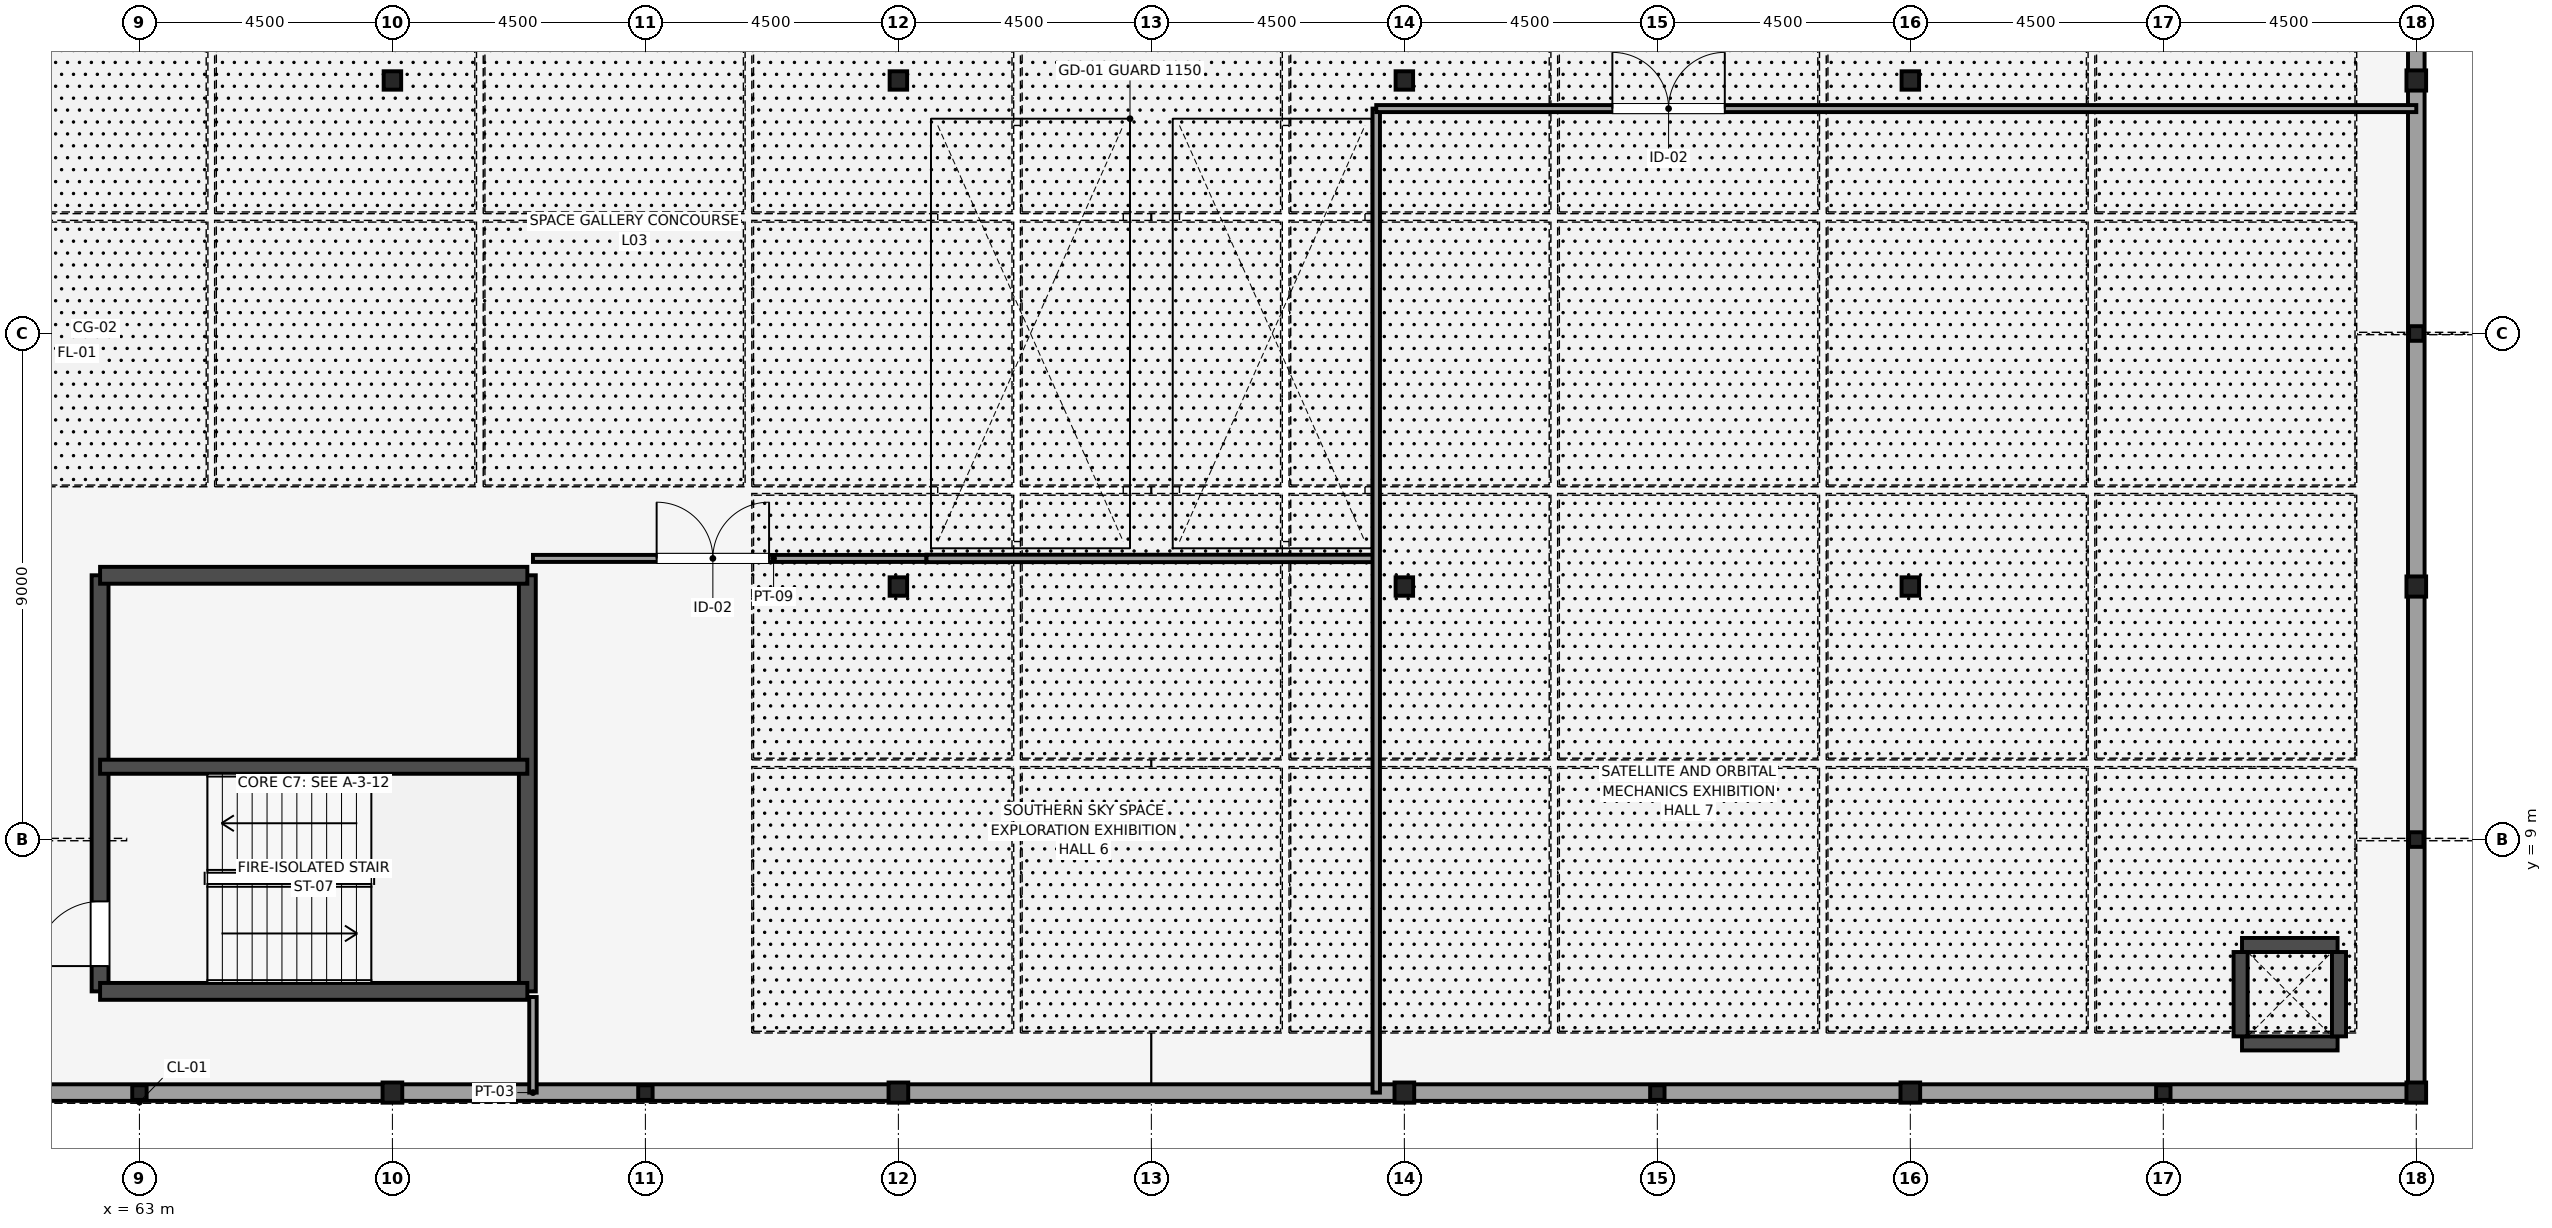
"""IFC4 building model, lengths in metres.
Left out: names, types, materials, properties, quantities, classifications, styles, units other than length and angle.
Written with IfcOpenShell. Run it as: python <this file> out.ifc"""

import sys

from ifc_helpers import new_model, si_unit, direction, frame, frame_2d, origin, origin_2d, place, context, subcontext, project, spatial, rectangle, i_section, extrude, element, fill, save


model = new_model("IFC4")
c1 = context("Model", 3, precision=1e-05, world=origin(), true_north=direction((0.0, 1.0)))
c2 = subcontext(c1, "Body", "Model", "MODEL_VIEW")
j1 = project(units=[si_unit("LENGTHUNIT", "METRE"), si_unit("PLANEANGLEUNIT", "RADIAN")], contexts=[c1])
p1 = place(None, origin())
s1 = spatial("IfcSite", under=j1, at=p1, CompositionType="ELEMENT")
p2 = place(p1, origin())
s2 = spatial("IfcBuilding", under=s1, at=p2, CompositionType="ELEMENT")
p3 = place(p2, frame((0.0, 0.0, 14.4)))
s3 = spatial("IfcBuildingStorey", under=s2, at=p3, CompositionType="ELEMENT", Elevation=14.4)
p4 = place(p3, frame((67.5, 4.5, 0.0), z_axis=(0.0, 0.0, 1.0), x_axis=(1.0, 0.0, 0.0)))
e1 = element("IfcColumn", 1, at=p4, inside=s3, PredefinedType="COLUMN", context=c2, shape_type="SweptSolid", body=[
    extrude(i_section(OverallWidth=0.35, OverallDepth=0.359, WebThickness=0.016, FlangeThickness=0.024, FilletRadius=0.014, at=origin_2d()), origin(), (0.0, 0.0, 1.0), 4.5),
])
p5 = place(p3, frame((67.5, 22.5, 0.0), z_axis=(0.0, 0.0, 1.0), x_axis=(1.0, 0.0, 0.0)))
e2 = element("IfcColumn", 2, at=p5, inside=s3, PredefinedType="COLUMN", context=c2, shape_type="SweptSolid", body=[
    extrude(i_section(OverallWidth=0.311, OverallDepth=0.327, WebThickness=0.016, FlangeThickness=0.025, FilletRadius=0.017, at=origin_2d()), origin(), (0.0, 0.0, 1.0), 4.5),
])
p6 = place(p3, frame((76.5, 4.5, 0.0), z_axis=(0.0, 0.0, 1.0), x_axis=(1.0, 0.0, 0.0)))
e3 = element("IfcColumn", 3, at=p6, inside=s3, PredefinedType="COLUMN", context=c2, shape_type="SweptSolid", body=[
    extrude(i_section(OverallWidth=0.35, OverallDepth=0.359, WebThickness=0.016, FlangeThickness=0.024, FilletRadius=0.014, at=origin_2d()), origin(), (0.0, 0.0, 1.0), 4.5),
])
for number, where, z_axis, x_axis in (
    (4, (76.5, 13.5, 0.0), (0.0, 0.0, 1.0), (1.0, 0.0, 0.0)),
    (5, (76.5, 22.5, 0.0), (0.0, 0.0, 1.0), (1.0, 0.0, 0.0)),
):
    element("IfcColumn", number, at=place(p3, frame(where, z_axis=z_axis, x_axis=x_axis)), inside=s3, PredefinedType="COLUMN", context=c2, shape_type="SweptSolid", body=[
        extrude(i_section(OverallWidth=0.311, OverallDepth=0.327, WebThickness=0.016, FlangeThickness=0.025, FilletRadius=0.017, at=origin_2d()), origin(), (0.0, 0.0, 1.0), 4.5),
    ])
p7 = place(p3, frame((85.5, 4.5, 0.0), z_axis=(0.0, 0.0, 1.0), x_axis=(1.0, 0.0, 0.0)))
e6 = element("IfcColumn", 6, at=p7, inside=s3, PredefinedType="COLUMN", context=c2, shape_type="SweptSolid", body=[
    extrude(i_section(OverallWidth=0.35, OverallDepth=0.359, WebThickness=0.016, FlangeThickness=0.024, FilletRadius=0.014, at=origin_2d()), origin(), (0.0, 0.0, 1.0), 4.5),
])
for number, where, z_axis, x_axis in (
    (7, (85.5, 13.5, 0.0), (0.0, 0.0, 1.0), (1.0, 0.0, 0.0)),
    (8, (85.5, 22.5, 0.0), (0.0, 0.0, 1.0), (1.0, 0.0, 0.0)),
):
    element("IfcColumn", number, at=place(p3, frame(where, z_axis=z_axis, x_axis=x_axis)), inside=s3, PredefinedType="COLUMN", context=c2, shape_type="SweptSolid", body=[
        extrude(i_section(OverallWidth=0.311, OverallDepth=0.327, WebThickness=0.016, FlangeThickness=0.025, FilletRadius=0.017, at=origin_2d()), origin(), (0.0, 0.0, 1.0), 4.5),
    ])
p8 = place(p3, frame((94.5, 4.5, 0.0), z_axis=(0.0, 0.0, 1.0), x_axis=(1.0, 0.0, 0.0)))
e9 = element("IfcColumn", 9, at=p8, inside=s3, PredefinedType="COLUMN", context=c2, shape_type="SweptSolid", body=[
    extrude(i_section(OverallWidth=0.35, OverallDepth=0.359, WebThickness=0.016, FlangeThickness=0.024, FilletRadius=0.014, at=origin_2d()), origin(), (0.0, 0.0, 1.0), 4.5),
])
for number, where, z_axis, x_axis in (
    (10, (94.5, 13.5, 0.0), (0.0, 0.0, 1.0), (1.0, 0.0, 0.0)),
    (11, (94.5, 22.5, 0.0), (0.0, 0.0, 1.0), (1.0, 0.0, 0.0)),
):
    element("IfcColumn", number, at=place(p3, frame(where, z_axis=z_axis, x_axis=x_axis)), inside=s3, PredefinedType="COLUMN", context=c2, shape_type="SweptSolid", body=[
        extrude(i_section(OverallWidth=0.311, OverallDepth=0.327, WebThickness=0.016, FlangeThickness=0.025, FilletRadius=0.017, at=origin_2d()), origin(), (0.0, 0.0, 1.0), 4.5),
    ])
for number, where, z_axis, x_axis in (
    (12, (103.5, 4.5, 0.0), (0.0, 0.0, 1.0), (1.0, 0.0, 0.0)),
    (13, (103.5, 13.5, 0.0), (0.0, 0.0, 1.0), (1.0, 0.0, 0.0)),
    (14, (103.5, 22.5, 0.0), (0.0, 0.0, 1.0), (1.0, 0.0, 0.0)),
):
    element("IfcColumn", number, at=place(p3, frame(where, z_axis=z_axis, x_axis=x_axis)), inside=s3, PredefinedType="COLUMN", context=c2, shape_type="SweptSolid", body=[
        extrude(i_section(OverallWidth=0.35, OverallDepth=0.359, WebThickness=0.016, FlangeThickness=0.024, FilletRadius=0.014, at=origin_2d()), origin(), (0.0, 0.0, 1.0), 4.5),
    ])
for number, where, z_axis, x_axis in (
    (15, (63.0, 4.5, 0.0), (0.0, 0.0, 1.0), (1.0, 0.0, 0.0)),
    (16, (72.0, 4.5, 0.0), (0.0, 0.0, 1.0), (1.0, 0.0, 0.0)),
    (17, (90.0, 4.5, 0.0), (0.0, 0.0, 1.0), (1.0, 0.0, 0.0)),
    (18, (99.0, 4.5, 0.0), (0.0, 0.0, 1.0), (1.0, 0.0, 0.0)),
    (19, (103.5, 9.0, 0.0), (0.0, 0.0, 1.0), (1.0, 0.0, 0.0)),
    (20, (103.5, 18.0, 0.0), (0.0, 0.0, 1.0), (1.0, 0.0, 0.0)),
):
    element("IfcColumn", number, at=place(p3, frame(where, z_axis=z_axis, x_axis=x_axis)), inside=s3, PredefinedType="PILASTER", context=c2, shape_type="SweptSolid", body=[
        extrude(i_section(OverallWidth=0.256, OverallDepth=0.26, WebThickness=0.01, FlangeThickness=0.017, FilletRadius=0.014, at=origin_2d()), origin(), (0.0, 0.0, 1.0), 4.5),
    ])
p9 = place(p3, frame((62.3, 6.3, 0.0), z_axis=(0.0, 0.0, 1.0), x_axis=(0.0, 1.0, 0.0)))
e21 = element("IfcWall", 21, at=p9, inside=s3, PredefinedType="SHEAR", context=c2, shape_type="SweptSolid", body=[
    extrude(rectangle(XDim=7.4, YDim=0.3, at=frame_2d((3.7, 0.0))), origin(), (0.0, 0.0, 1.0), 4.5),
])
p10 = place(p9, frame((0.45, 0.0, 0.0)))
e22 = element("IfcOpeningElement", 22, at=p10, cuts=e21, PredefinedType="OPENING", context=c2, shape_type="SweptSolid", body=[
    extrude(rectangle(XDim=1.15, YDim=2.15, at=frame_2d((0.575, 1.075))), frame((0.0, 0.16, 0.0), z_axis=(0.0, -1.0, 0.0), x_axis=(1.0, 0.0, 0.0)), (0.0, 0.0, 1.0), 0.32),
])
p11 = place(p3, frame((69.9, 6.3, 0.0), z_axis=(0.0, 0.0, 1.0), x_axis=(0.0, 1.0, 0.0)))
e23 = element("IfcWall", 23, at=p11, inside=s3, PredefinedType="SHEAR", context=c2, shape_type="SweptSolid", body=[
    extrude(rectangle(XDim=7.4, YDim=0.3, at=frame_2d((3.7, 0.0))), origin(), (0.0, 0.0, 1.0), 4.5),
])
for number, where, z_axis, x_axis in (
    (24, (62.3, 6.3, 0.0), (0.0, 0.0, 1.0), (1.0, 0.0, 0.0)),
    (25, (62.3, 13.7, 0.0), (0.0, 0.0, 1.0), (1.0, 0.0, 0.0)),
):
    element("IfcWall", number, at=place(p3, frame(where, z_axis=z_axis, x_axis=x_axis)), inside=s3, PredefinedType="SHEAR", context=c2, shape_type="SweptSolid", body=[
        extrude(rectangle(XDim=7.6, YDim=0.3, at=frame_2d((3.8, 0.0))), origin(), (0.0, 0.0, 1.0), 4.5),
    ])
p12 = place(p3, frame((62.3, 10.295, 0.0), z_axis=(0.0, 0.0, 1.0), x_axis=(1.0, 0.0, 0.0)))
e26 = element("IfcWall", 26, at=p12, inside=s3, PredefinedType="SHEAR", context=c2, shape_type="SweptSolid", body=[
    extrude(rectangle(XDim=7.6, YDim=0.25, at=frame_2d((3.8, 0.0))), origin(), (0.0, 0.0, 1.0), 4.5),
])
for number, where, z_axis, x_axis in (
    (27, (100.4, 5.375, 0.0), (0.0, 0.0, 1.0), (1.0, 0.0, 0.0)),
    (28, (100.4, 7.125, 0.0), (0.0, 0.0, 1.0), (1.0, 0.0, 0.0)),
):
    element("IfcWall", number, at=place(p3, frame(where, z_axis=z_axis, x_axis=x_axis)), inside=s3, PredefinedType="SHEAR", context=c2, shape_type="SweptSolid", body=[
        extrude(rectangle(XDim=1.7, YDim=0.25, at=frame_2d((0.85, 0.0))), origin(), (0.0, 0.0, 1.0), 3.77),
    ])
for number, where, z_axis, x_axis in (
    (29, (100.375, 5.5, 0.0), (0.0, 0.0, 1.0), (0.0, 1.0, 0.0)),
    (30, (102.125, 5.5, 0.0), (0.0, 0.0, 1.0), (0.0, 1.0, 0.0)),
):
    element("IfcWall", number, at=place(p3, frame(where, z_axis=z_axis, x_axis=x_axis)), inside=s3, PredefinedType="SHEAR", context=c2, shape_type="SweptSolid", body=[
        extrude(rectangle(XDim=1.5, YDim=0.25, at=frame_2d((0.75, 0.0))), origin(), (0.0, 0.0, 1.0), 3.77),
    ])
for number, where, z_axis, x_axis in (
    (31, (58.5, 4.5, 0.0), (0.0, 0.0, 1.0), (1.0, 0.0, 0.0)),
    (32, (67.5, 4.5, 0.0), (0.0, 0.0, 1.0), (1.0, 0.0, 0.0)),
    (33, (76.5, 4.5, 0.0), (0.0, 0.0, 1.0), (1.0, 0.0, 0.0)),
    (34, (85.5, 4.5, 0.0), (0.0, 0.0, 1.0), (1.0, 0.0, 0.0)),
    (35, (94.5, 4.5, 0.0), (0.0, 0.0, 1.0), (1.0, 0.0, 0.0)),
    (36, (103.5, 4.5, 0.0), (0.0, 0.0, 1.0), (0.0, 1.0, 0.0)),
    (37, (103.5, 13.5, 0.0), (0.0, 0.0, 1.0), (0.0, 1.0, 0.0)),
    (38, (103.5, 22.5, 0.0), (0.0, 0.0, 1.0), (0.0, 1.0, 0.0)),
):
    element("IfcWall", number, at=place(p3, frame(where, z_axis=z_axis, x_axis=x_axis)), inside=s3, PredefinedType="STANDARD", context=c2, shape_type="SweptSolid", body=[
        extrude(rectangle(XDim=9.0, YDim=0.295, at=frame_2d((4.5, 0.0))), origin(), (0.0, 0.0, 1.0), 3.846),
    ])
p13 = place(p3, frame((70.0, 4.5, 0.0), z_axis=(0.0, 0.0, 1.0), x_axis=(0.0, 1.0, 0.0)))
e39 = element("IfcWall", 39, at=p13, inside=s3, PredefinedType="PARTITIONING", context=c2, shape_type="SweptSolid", body=[
    extrude(rectangle(XDim=1.7, YDim=0.132, at=frame_2d((0.85, 0.0))), origin(), (0.0, 0.0, 1.0), 4.32),
])
p14 = place(p3, frame((70.0, 14.0, 0.0), z_axis=(0.0, 0.0, 1.0), x_axis=(1.0, 0.0, 0.0)))
e40 = element("IfcWall", 40, at=p14, inside=s3, PredefinedType="MOVABLE", context=c2, shape_type="SweptSolid", body=[
    extrude(rectangle(XDim=7.0, YDim=0.125, at=frame_2d((3.5, 0.0))), origin(), (0.0, 0.0, 1.0), 4.32),
])
p15 = place(p14, frame((2.2, 0.0, 0.0)))
e41 = element("IfcOpeningElement", 41, at=p15, cuts=e40, PredefinedType="OPENING", context=c2, shape_type="SweptSolid", body=[
    extrude(rectangle(XDim=2.0, YDim=2.4, at=frame_2d((1.0, 1.2))), frame((0.0, 0.073, 0.0), z_axis=(0.0, -1.0, 0.0), x_axis=(1.0, 0.0, 0.0)), (0.0, 0.0, 1.0), 0.145),
])
p16 = place(p3, frame((77.0, 14.0, 0.0), z_axis=(0.0, 0.0, 1.0), x_axis=(1.0, 0.0, 0.0)))
e42 = element("IfcWall", 42, at=p16, inside=s3, PredefinedType="PARTITIONING", context=c2, shape_type="SweptSolid", body=[
    extrude(rectangle(XDim=8.0, YDim=0.132, at=frame_2d((4.0, 0.0))), origin(), (0.0, 0.0, 1.0), 4.32),
])
p17 = place(p3, frame((85.0, 4.5, 0.0), z_axis=(0.0, 0.0, 1.0), x_axis=(0.0, 1.0, 0.0)))
e43 = element("IfcWall", 43, at=p17, inside=s3, PredefinedType="PARTITIONING", context=c2, shape_type="SweptSolid", body=[
    extrude(rectangle(XDim=17.5, YDim=0.132, at=frame_2d((8.75, 0.0))), origin(), (0.0, 0.0, 1.0), 4.32),
])
p18 = place(p3, frame((85.0, 22.0, 0.0), z_axis=(0.0, 0.0, 1.0), x_axis=(1.0, 0.0, 0.0)))
e44 = element("IfcWall", 44, at=p18, inside=s3, PredefinedType="MOVABLE", context=c2, shape_type="SweptSolid", body=[
    extrude(rectangle(XDim=18.5, YDim=0.125, at=frame_2d((9.25, 0.0))), origin(), (0.0, 0.0, 1.0), 4.32),
])
p19 = place(p18, frame((4.2, 0.0, 0.0)))
e45 = element("IfcOpeningElement", 45, at=p19, cuts=e44, PredefinedType="OPENING", context=c2, shape_type="SweptSolid", body=[
    extrude(rectangle(XDim=2.0, YDim=2.4, at=frame_2d((1.0, 1.2))), frame((0.0, 0.073, 0.0), z_axis=(0.0, -1.0, 0.0), x_axis=(1.0, 0.0, 0.0)), (0.0, 0.0, 1.0), 0.145),
])
p20 = place(p10, origin())
e46 = element("IfcDoor", 46, at=p20, inside=s3, OperationType="SINGLE_SWING_LEFT", PredefinedType="DOOR", context=c2, shape_type="SweptSolid", body=[
    extrude(rectangle(XDim=1.15, YDim=2.15, at=frame_2d((0.575, 1.075))), frame((0.0, 0.025, 0.0), z_axis=(0.0, -1.0, 0.0), x_axis=(1.0, 0.0, 0.0)), (0.0, 0.0, 1.0), 0.05),
])
fill(e22, e46)
p21 = place(p15, origin())
e47 = element("IfcDoor", 47, at=p21, inside=s3, OperationType="DOUBLE_DOOR_DOUBLE_SWING", PredefinedType="DOOR", context=c2, shape_type="SweptSolid", body=[
    extrude(rectangle(XDim=2.0, YDim=2.4, at=frame_2d((1.0, 1.2))), frame((0.0, 0.025, 0.0), z_axis=(0.0, -1.0, 0.0), x_axis=(1.0, 0.0, 0.0)), (0.0, 0.0, 1.0), 0.05),
])
fill(e41, e47)
p22 = place(p19, origin())
e48 = element("IfcDoor", 48, at=p22, inside=s3, OperationType="DOUBLE_DOOR_DOUBLE_SWING", PredefinedType="DOOR", context=c2, shape_type="SweptSolid", body=[
    extrude(rectangle(XDim=2.0, YDim=2.4, at=frame_2d((1.0, 1.2))), frame((0.0, 0.025, 0.0), z_axis=(0.0, -1.0, 0.0), x_axis=(1.0, 0.0, 0.0)), (0.0, 0.0, 1.0), 0.05),
])
fill(e45, e48)
save(model, sys.argv[1])
